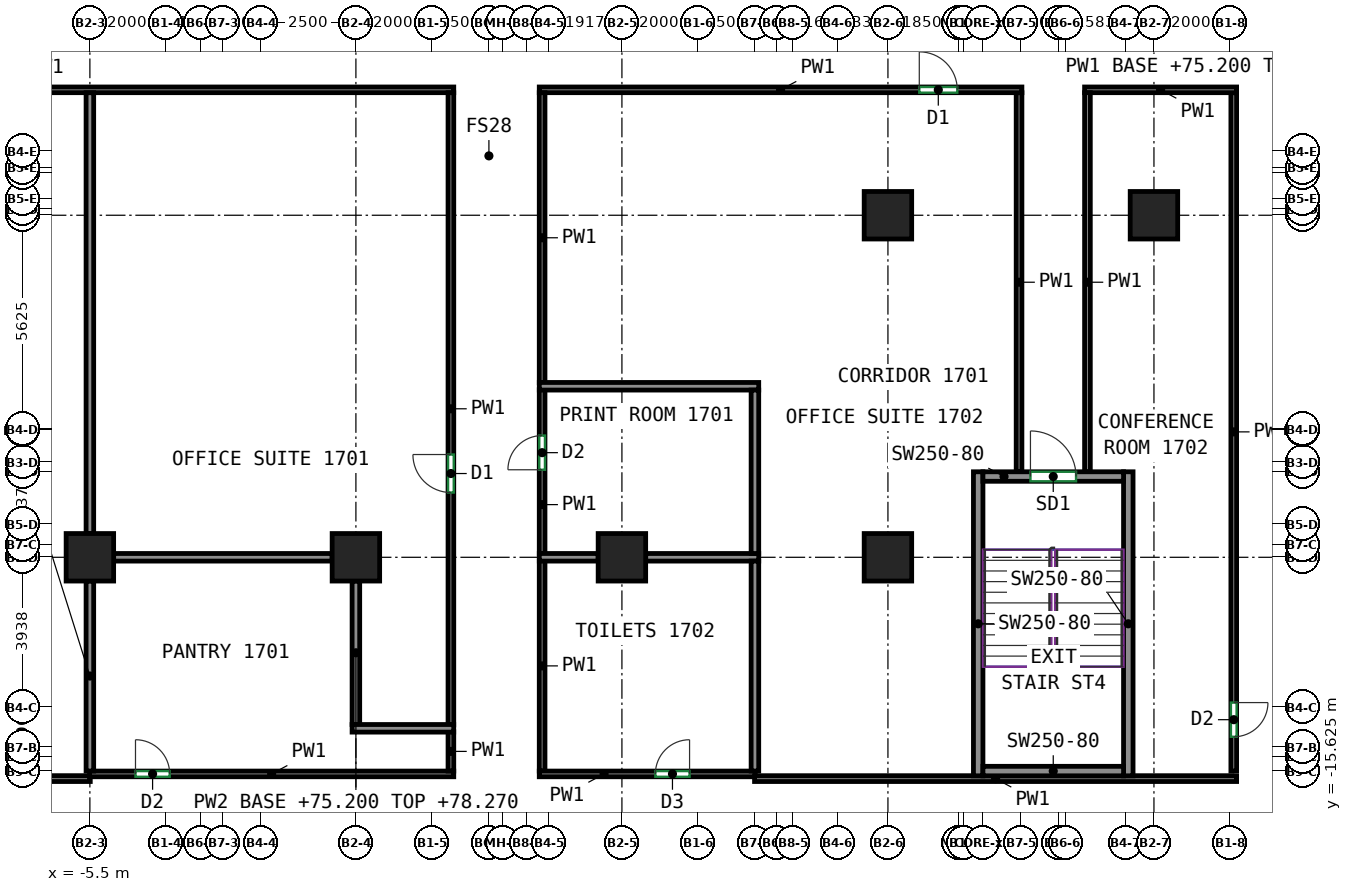
"""IFC4 building model, lengths in metres.
Left out: names, types, materials, properties, quantities, classifications, styles, units other than length and angle.
Written with IfcOpenShell. Run it as: python <this file> out.ifc"""

import sys

from ifc_helpers import new_model, si_unit, direction, frame, frame_2d, origin, origin_2d, place, context, subcontext, project, spatial, rectangle, extrude, source, transform, mapped, element, fill, save


model = new_model("IFC4")
c1 = context("Model", 3, precision=1e-05, world=origin(), true_north=direction((0.0, 1.0)))
c2 = subcontext(c1, "Body", "Model", "MODEL_VIEW")
j1 = project(units=[si_unit("LENGTHUNIT", "METRE"), si_unit("PLANEANGLEUNIT", "RADIAN")], contexts=[c1])
p1 = place(None, origin())
s1 = spatial("IfcSite", under=j1, at=p1, CompositionType="ELEMENT")
p2 = place(p1, origin())
s2 = spatial("IfcBuilding", under=s1, at=p2, CompositionType="ELEMENT")
p3 = place(p2, frame((0.0, 0.0, 75.2)))
s3 = spatial("IfcBuildingStorey", under=s2, at=p3, CompositionType="ELEMENT", Elevation=75.2)
m1 = source(origin(), c2, "Body", "SweptSolid", [
    extrude(rectangle(XDim=1.25, YDim=1.25, at=origin_2d()), origin(), (0.0, 0.0, 1.0), 3.72),
])
for number, where, z_axis, x_axis in (
    (1, (-5.5, -10.0, 0.0), (0.0, 0.0, 1.0), (1.0, 0.0, 0.0)),
    (2, (1.5, -10.0, 0.0), (0.0, 0.0, 1.0), (1.0, 0.0, 0.0)),
    (3, (8.5, -10.0, 0.0), (0.0, 0.0, 1.0), (1.0, 0.0, 0.0)),
    (4, (15.5, -10.0, 0.0), (0.0, 0.0, 1.0), (1.0, 0.0, 0.0)),
    (5, (15.5, -1.0, 0.0), (0.0, 0.0, 1.0), (1.0, 0.0, 0.0)),
    (6, (22.5, -1.0, 0.0), (0.0, 0.0, 1.0), (1.0, 0.0, 0.0)),
):
    element("IfcColumn", number, at=place(p3, frame(where, z_axis=z_axis, x_axis=x_axis)), inside=s3, PredefinedType="COLUMN", context=c2, shape_type="MappedRepresentation", body=[
        mapped(m1, transform((0.0, 0.0, 0.0))),
    ])
m2 = source(origin(), c2, "Body", "SweptSolid", [
    extrude(rectangle(XDim=8.0, YDim=0.25, at=frame_2d((4.0, 0.0))), origin(), (0.0, 0.0, 1.0), 3.72),
])
for number, where, z_axis, x_axis in (
    (7, (17.875, -15.75, 0.0), (0.0, 0.0, 1.0), (0.0, 1.0, 0.0)),
    (8, (21.825, -15.75, 0.0), (0.0, 0.0, 1.0), (0.0, 1.0, 0.0)),
):
    element("IfcWall", number, at=place(p3, frame(where, z_axis=z_axis, x_axis=x_axis)), inside=s3, PredefinedType="SHEAR", context=c2, shape_type="MappedRepresentation", body=[
        mapped(m2, transform((0.0, 0.0, 0.0))),
    ])
m3 = source(origin(), c2, "Body", "SweptSolid", [
    extrude(rectangle(XDim=3.7, YDim=0.25, at=frame_2d((1.85, 0.0))), origin(), (0.0, 0.0, 1.0), 3.72),
])
p4 = place(p3, frame((18.0, -15.625, 0.0), z_axis=(0.0, 0.0, 1.0), x_axis=(1.0, 0.0, 0.0)))
e9 = element("IfcWall", 9, at=p4, inside=s3, PredefinedType="SHEAR", context=c2, shape_type="MappedRepresentation", body=[
    mapped(m3, transform((0.0, 0.0, 0.0))),
])
p5 = place(p3, frame((18.0, -7.875, 0.0), z_axis=(0.0, 0.0, 1.0), x_axis=(1.0, 0.0, 0.0)))
e10 = element("IfcWall", 10, at=p5, inside=s3, PredefinedType="SHEAR", context=c2, shape_type="MappedRepresentation", body=[
    mapped(m3, transform((0.0, 0.0, 0.0))),
])
p6 = place(p5, frame((1.25, 0.0, 0.0)))
e11 = element("IfcOpeningElement", 11, at=p6, cuts=e10, PredefinedType="OPENING", context=c2, shape_type="SweptSolid", body=[
    extrude(rectangle(XDim=1.2, YDim=2.1, at=frame_2d((0.6, 1.05))), frame((0.0, 0.135, 0.0), z_axis=(0.0, -1.0, 0.0), x_axis=(1.0, 0.0, 0.0)), (0.0, 0.0, 1.0), 0.27),
])
p7 = place(p3, frame((-14.9, -15.825, 0.0), z_axis=(0.0, 0.0, 1.0), x_axis=(1.0, 0.0, 0.0)))
e12 = element("IfcWall", 12, at=p7, inside=s3, PredefinedType="PARTITIONING", context=c2, shape_type="SweptSolid", body=[
    extrude(rectangle(XDim=9.41, YDim=0.15, at=frame_2d((4.705, 0.0))), origin(), (0.0, 0.0, 1.0), 3.72),
])
p8 = place(p3, frame((-19.325, 2.3, 0.0), z_axis=(0.0, 0.0, 1.0), x_axis=(1.0, 0.0, 0.0)))
e13 = element("IfcWall", 13, at=p8, inside=s3, PredefinedType="PARTITIONING", context=c2, shape_type="SweptSolid", body=[
    extrude(rectangle(XDim=23.4, YDim=0.15, at=frame_2d((11.7, 0.0))), origin(), (0.0, 0.0, 1.0), 3.72),
])
p9 = place(p8, frame((8.726, 0.0, 0.0)))
e14 = element("IfcOpeningElement", 14, at=p9, cuts=e13, PredefinedType="OPENING", context=c2, shape_type="SweptSolid", body=[
    extrude(rectangle(XDim=1.8, YDim=2.1, at=frame_2d((0.9, 1.05))), frame((0.0, 0.085, 0.0), z_axis=(0.0, -1.0, 0.0), x_axis=(1.0, 0.0, 0.0)), (0.0, 0.0, 1.0), 0.17),
])
p10 = place(p3, frame((-5.51, -15.7, 0.0), z_axis=(0.0, 0.0, 1.0), x_axis=(1.0, 0.0, 0.0)))
e15 = element("IfcWall", 15, at=p10, inside=s3, PredefinedType="PARTITIONING", context=c2, shape_type="SweptSolid", body=[
    extrude(rectangle(XDim=9.585, YDim=0.15, at=frame_2d((4.792, 0.0))), origin(), (0.0, 0.0, 1.0), 3.72),
])
p11 = place(p10, frame((1.21, 0.0, 0.0)))
e16 = element("IfcOpeningElement", 16, at=p11, cuts=e15, PredefinedType="OPENING", context=c2, shape_type="SweptSolid", body=[
    extrude(rectangle(XDim=0.9, YDim=2.1, at=frame_2d((0.45, 1.05))), frame((0.0, 0.085, 0.0), z_axis=(0.0, -1.0, 0.0), x_axis=(1.0, 0.0, 0.0)), (0.0, 0.0, 1.0), 0.17),
])
p12 = place(p3, frame((4.0, -15.625, 0.0), z_axis=(0.0, 0.0, 1.0), x_axis=(0.0, 1.0, 0.0)))
e17 = element("IfcWall", 17, at=p12, inside=s3, PredefinedType="PARTITIONING", context=c2, shape_type="SweptSolid", body=[
    extrude(rectangle(XDim=1.035, YDim=0.15, at=frame_2d((0.518, 0.0))), origin(), (0.0, 0.0, 1.0), 3.72),
])
p13 = place(p3, frame((4.0, -14.41, 0.0), z_axis=(0.0, 0.0, 1.0), x_axis=(0.0, 1.0, 0.0)))
e18 = element("IfcWall", 18, at=p13, inside=s3, PredefinedType="PARTITIONING", context=c2, shape_type="SweptSolid", body=[
    extrude(rectangle(XDim=16.635, YDim=0.15, at=frame_2d((8.317, 0.0))), origin(), (0.0, 0.0, 1.0), 3.72),
])
p14 = place(p13, frame((6.114, 0.0, 0.0)))
e19 = element("IfcOpeningElement", 19, at=p14, cuts=e18, PredefinedType="OPENING", context=c2, shape_type="SweptSolid", body=[
    extrude(rectangle(XDim=1.0, YDim=2.1, at=frame_2d((0.5, 1.05))), frame((0.0, 0.085, 0.0), z_axis=(0.0, -1.0, 0.0), x_axis=(1.0, 0.0, 0.0)), (0.0, 0.0, 1.0), 0.17),
])
p15 = place(p3, frame((6.4, -15.625, 0.0), z_axis=(0.0, 0.0, 1.0), x_axis=(0.0, 1.0, 0.0)))
e20 = element("IfcWall", 20, at=p15, inside=s3, PredefinedType="PARTITIONING", context=c2, shape_type="SweptSolid", body=[
    extrude(rectangle(XDim=5.535, YDim=0.15, at=frame_2d((2.768, 0.0))), origin(), (0.0, 0.0, 1.0), 3.72),
])
p16 = place(p3, frame((6.325, -15.7, 0.0), z_axis=(0.0, 0.0, 1.0), x_axis=(1.0, 0.0, 0.0)))
e21 = element("IfcWall", 21, at=p16, inside=s3, PredefinedType="PARTITIONING", context=c2, shape_type="SweptSolid", body=[
    extrude(rectangle(XDim=5.685, YDim=0.15, at=frame_2d((2.843, 0.0))), origin(), (0.0, 0.0, 1.0), 3.72),
])
p17 = place(p16, frame((3.055, 0.0, 0.0)))
e22 = element("IfcOpeningElement", 22, at=p17, cuts=e21, PredefinedType="OPENING", context=c2, shape_type="SweptSolid", body=[
    extrude(rectangle(XDim=0.9, YDim=2.1, at=frame_2d((0.45, 1.05))), frame((0.0, 0.085, 0.0), z_axis=(0.0, -1.0, 0.0), x_axis=(1.0, 0.0, 0.0)), (0.0, 0.0, 1.0), 0.17),
])
p18 = place(p3, frame((6.4, -9.91, 0.0), z_axis=(0.0, 0.0, 1.0), x_axis=(0.0, 1.0, 0.0)))
e23 = element("IfcWall", 23, at=p18, inside=s3, PredefinedType="PARTITIONING", context=c2, shape_type="SweptSolid", body=[
    extrude(rectangle(XDim=4.32, YDim=0.15, at=frame_2d((2.16, 0.0))), origin(), (0.0, 0.0, 1.0), 3.72),
])
p19 = place(p18, frame((2.213, 0.0, 0.0)))
e24 = element("IfcOpeningElement", 24, at=p19, cuts=e23, PredefinedType="OPENING", context=c2, shape_type="SweptSolid", body=[
    extrude(rectangle(XDim=0.9, YDim=2.1, at=frame_2d((0.45, 1.05))), frame((0.0, 0.085, 0.0), z_axis=(0.0, -1.0, 0.0), x_axis=(1.0, 0.0, 0.0)), (0.0, 0.0, 1.0), 0.17),
])
p20 = place(p3, frame((18.95, 2.225, 0.0), z_axis=(0.0, 0.0, 1.0), x_axis=(0.0, -1.0, 0.0)))
e25 = element("IfcWall", 25, at=p20, inside=s3, PredefinedType="PARTITIONING", context=c2, shape_type="SweptSolid", body=[
    extrude(rectangle(XDim=9.975, YDim=0.15, at=frame_2d((4.988, 0.0))), origin(), (0.0, 0.0, 1.0), 3.72),
])
p21 = place(p3, frame((6.325, 2.3, 0.0), z_axis=(0.0, 0.0, 1.0), x_axis=(1.0, 0.0, 0.0)))
e26 = element("IfcWall", 26, at=p21, inside=s3, PredefinedType="PARTITIONING", context=c2, shape_type="SweptSolid", body=[
    extrude(rectangle(XDim=12.7, YDim=0.15, at=frame_2d((6.35, 0.0))), origin(), (0.0, 0.0, 1.0), 3.72),
])
p22 = place(p21, frame((10.0, 0.0, 0.0)))
e27 = element("IfcOpeningElement", 27, at=p22, cuts=e26, PredefinedType="OPENING", context=c2, shape_type="SweptSolid", body=[
    extrude(rectangle(XDim=1.0, YDim=2.1, at=frame_2d((0.5, 1.05))), frame((0.0, 0.085, 0.0), z_axis=(0.0, -1.0, 0.0), x_axis=(1.0, 0.0, 0.0)), (0.0, 0.0, 1.0), 0.17),
])
p23 = place(p3, frame((6.4, -5.41, 0.0), z_axis=(0.0, 0.0, 1.0), x_axis=(0.0, 1.0, 0.0)))
e28 = element("IfcWall", 28, at=p23, inside=s3, PredefinedType="PARTITIONING", context=c2, shape_type="SweptSolid", body=[
    extrude(rectangle(XDim=7.635, YDim=0.15, at=frame_2d((3.817, 0.0))), origin(), (0.0, 0.0, 1.0), 3.72),
])
p24 = place(p3, frame((11.99, -15.825, 0.0), z_axis=(0.0, 0.0, 1.0), x_axis=(1.0, 0.0, 0.0)))
e29 = element("IfcWall", 29, at=p24, inside=s3, PredefinedType="PARTITIONING", context=c2, shape_type="SweptSolid", body=[
    extrude(rectangle(XDim=12.685, YDim=0.15, at=frame_2d((6.343, 0.0))), origin(), (0.0, 0.0, 1.0), 3.72),
])
p25 = place(p3, frame((24.6, 2.225, 0.0), z_axis=(0.0, 0.0, 1.0), x_axis=(0.0, -1.0, 0.0)))
e30 = element("IfcWall", 30, at=p25, inside=s3, PredefinedType="PARTITIONING", context=c2, shape_type="SweptSolid", body=[
    extrude(rectangle(XDim=17.85, YDim=0.15, at=frame_2d((8.925, 0.0))), origin(), (0.0, 0.0, 1.0), 3.72),
])
p26 = place(p25, frame((16.048, 0.0, 0.0)))
e31 = element("IfcOpeningElement", 31, at=p26, cuts=e30, PredefinedType="OPENING", context=c2, shape_type="SweptSolid", body=[
    extrude(rectangle(XDim=0.9, YDim=2.1, at=frame_2d((0.45, 1.05))), frame((0.0, 0.085, 0.0), z_axis=(0.0, -1.0, 0.0), x_axis=(1.0, 0.0, 0.0)), (0.0, 0.0, 1.0), 0.17),
])
p27 = place(p3, frame((20.675, 2.3, 0.0), z_axis=(0.0, 0.0, 1.0), x_axis=(1.0, 0.0, 0.0)))
e32 = element("IfcWall", 32, at=p27, inside=s3, PredefinedType="PARTITIONING", context=c2, shape_type="SweptSolid", body=[
    extrude(rectangle(XDim=4.0, YDim=0.15, at=frame_2d((2.0, 0.0))), origin(), (0.0, 0.0, 1.0), 3.72),
])
p28 = place(p3, frame((20.75, -7.75, 0.0), z_axis=(0.0, 0.0, 1.0), x_axis=(0.0, 1.0, 0.0)))
e33 = element("IfcWall", 33, at=p28, inside=s3, PredefinedType="PARTITIONING", context=c2, shape_type="SweptSolid", body=[
    extrude(rectangle(XDim=9.975, YDim=0.15, at=frame_2d((4.988, 0.0))), origin(), (0.0, 0.0, 1.0), 3.72),
])
p29 = place(p3, frame((-5.5, -15.624, 0.0), z_axis=(0.0, 0.0, 1.0), x_axis=(0.0, 1.0, 0.0)))
e34 = element("IfcWall", 34, at=p29, inside=s3, PredefinedType="PARTITIONING", context=c2, shape_type="SweptSolid", body=[
    extrude(rectangle(XDim=4.999, YDim=0.2, at=frame_2d((2.5, 0.0))), origin(), (0.0, 0.0, 1.0), 3.07),
])
p30 = place(p3, frame((-5.5, -9.375, 0.0), z_axis=(0.0, 0.0, 1.0), x_axis=(0.0, 1.0, 0.0)))
e35 = element("IfcWall", 35, at=p30, inside=s3, PredefinedType="PARTITIONING", context=c2, shape_type="SweptSolid", body=[
    extrude(rectangle(XDim=11.599, YDim=0.2, at=frame_2d((5.8, 0.0))), origin(), (0.0, 0.0, 1.0), 3.72),
])
p31 = place(p3, frame((-4.875, -10.0, 0.0), z_axis=(0.0, 0.0, 1.0), x_axis=(1.0, 0.0, 0.0)))
e36 = element("IfcWall", 36, at=p31, inside=s3, PredefinedType="PARTITIONING", context=c2, shape_type="SweptSolid", body=[
    extrude(rectangle(XDim=5.75, YDim=0.2, at=frame_2d((2.875, 0.0))), origin(), (0.0, 0.0, 1.0), 3.72),
])
p32 = place(p3, frame((1.5, -14.4, 0.0), z_axis=(0.0, 0.0, 1.0), x_axis=(0.0, 1.0, 0.0)))
e37 = element("IfcWall", 37, at=p32, inside=s3, PredefinedType="PARTITIONING", context=c2, shape_type="SweptSolid", body=[
    extrude(rectangle(XDim=3.775, YDim=0.2, at=frame_2d((1.887, 0.0))), origin(), (0.0, 0.0, 1.0), 3.07),
])
p33 = place(p3, frame((1.4, -14.5, 0.0), z_axis=(0.0, 0.0, 1.0), x_axis=(1.0, 0.0, 0.0)))
e38 = element("IfcWall", 38, at=p33, inside=s3, PredefinedType="PARTITIONING", context=c2, shape_type="SweptSolid", body=[
    extrude(rectangle(XDim=2.674, YDim=0.2, at=frame_2d((1.337, 0.0))), origin(), (0.0, 0.0, 1.0), 3.72),
])
p34 = place(p3, frame((6.326, -10.0, 0.0), z_axis=(0.0, 0.0, 1.0), x_axis=(1.0, 0.0, 0.0)))
e39 = element("IfcWall", 39, at=p34, inside=s3, PredefinedType="PARTITIONING", context=c2, shape_type="SweptSolid", body=[
    extrude(rectangle(XDim=1.549, YDim=0.2, at=frame_2d((0.774, 0.0))), origin(), (0.0, 0.0, 1.0), 3.72),
])
p35 = place(p3, frame((9.125, -10.0, 0.0), z_axis=(0.0, 0.0, 1.0), x_axis=(1.0, 0.0, 0.0)))
e40 = element("IfcWall", 40, at=p35, inside=s3, PredefinedType="PARTITIONING", context=c2, shape_type="SweptSolid", body=[
    extrude(rectangle(XDim=2.975, YDim=0.2, at=frame_2d((1.488, 0.0))), origin(), (0.0, 0.0, 1.0), 3.72),
])
p36 = place(p3, frame((12.0, -15.624, 0.0), z_axis=(0.0, 0.0, 1.0), x_axis=(0.0, 1.0, 0.0)))
e41 = element("IfcWall", 41, at=p36, inside=s3, PredefinedType="PARTITIONING", context=c2, shape_type="SweptSolid", body=[
    extrude(rectangle(XDim=5.524, YDim=0.2, at=frame_2d((2.762, 0.0))), origin(), (0.0, 0.0, 1.0), 3.72),
])
p37 = place(p3, frame((12.1, -5.5, 0.0), z_axis=(0.0, 0.0, 1.0), x_axis=(-1.0, 0.0, 0.0)))
e42 = element("IfcWall", 42, at=p37, inside=s3, PredefinedType="PARTITIONING", context=c2, shape_type="SweptSolid", body=[
    extrude(rectangle(XDim=5.774, YDim=0.2, at=frame_2d((2.887, 0.0))), origin(), (0.0, 0.0, 1.0), 3.72),
])
p38 = place(p3, frame((12.0, -9.9, 0.0), z_axis=(0.0, 0.0, 1.0), x_axis=(0.0, 1.0, 0.0)))
e43 = element("IfcWall", 43, at=p38, inside=s3, PredefinedType="PARTITIONING", context=c2, shape_type="SweptSolid", body=[
    extrude(rectangle(XDim=4.3, YDim=0.2, at=frame_2d((2.15, 0.0))), origin(), (0.0, 0.0, 1.0), 3.72),
])
p39 = place(p6, origin())
e44 = element("IfcDoor", 44, at=p39, inside=s3, OperationType="DOUBLE_DOOR_SINGLE_SWING", PredefinedType="DOOR", context=c2, shape_type="SweptSolid", body=[
    extrude(rectangle(XDim=1.2, YDim=2.1, at=frame_2d((0.6, 1.05))), frame((0.0, 0.025, 0.0), z_axis=(0.0, -1.0, 0.0), x_axis=(1.0, 0.0, 0.0)), (0.0, 0.0, 1.0), 0.05),
])
fill(e11, e44)
p40 = place(p11, origin())
e45 = element("IfcDoor", 45, at=p40, inside=s3, OperationType="SINGLE_SWING_LEFT", PredefinedType="DOOR", context=c2, shape_type="SweptSolid", body=[
    extrude(rectangle(XDim=0.9, YDim=2.1, at=frame_2d((0.45, 1.05))), frame((0.0, 0.025, 0.0), z_axis=(0.0, -1.0, 0.0), x_axis=(1.0, 0.0, 0.0)), (0.0, 0.0, 1.0), 0.05),
])
fill(e16, e45)
p41 = place(p17, origin())
e46 = element("IfcDoor", 46, at=p41, inside=s3, OperationType="SINGLE_SWING_RIGHT", PredefinedType="DOOR", context=c2, shape_type="SweptSolid", body=[
    extrude(rectangle(XDim=0.9, YDim=2.1, at=frame_2d((0.45, 1.05))), frame((0.0, 0.025, 0.0), z_axis=(0.0, -1.0, 0.0), x_axis=(1.0, 0.0, 0.0)), (0.0, 0.0, 1.0), 0.05),
])
fill(e22, e46)
p42 = place(p26, origin())
e47 = element("IfcDoor", 47, at=p42, inside=s3, OperationType="SINGLE_SWING_LEFT", PredefinedType="DOOR", context=c2, shape_type="SweptSolid", body=[
    extrude(rectangle(XDim=0.9, YDim=2.1, at=frame_2d((0.45, 1.05))), frame((0.0, 0.025, 0.0), z_axis=(0.0, -1.0, 0.0), x_axis=(1.0, 0.0, 0.0)), (0.0, 0.0, 1.0), 0.05),
])
fill(e31, e47)
p43 = place(p14, origin())
e48 = element("IfcDoor", 48, at=p43, inside=s3, OperationType="SINGLE_SWING_RIGHT", PredefinedType="DOOR", context=c2, shape_type="SweptSolid", body=[
    extrude(rectangle(XDim=1.0, YDim=2.1, at=frame_2d((0.5, 1.05))), frame((0.0, 0.025, 0.0), z_axis=(0.0, -1.0, 0.0), x_axis=(1.0, 0.0, 0.0)), (0.0, 0.0, 1.0), 0.05),
])
fill(e19, e48)
p44 = place(p19, origin())
e49 = element("IfcDoor", 49, at=p44, inside=s3, OperationType="SINGLE_SWING_LEFT", PredefinedType="DOOR", context=c2, shape_type="SweptSolid", body=[
    extrude(rectangle(XDim=0.9, YDim=2.1, at=frame_2d((0.45, 1.05))), frame((0.0, 0.025, 0.0), z_axis=(0.0, -1.0, 0.0), x_axis=(1.0, 0.0, 0.0)), (0.0, 0.0, 1.0), 0.05),
])
fill(e24, e49)
p45 = place(p22, origin())
e50 = element("IfcDoor", 50, at=p45, inside=s3, OperationType="SINGLE_SWING_LEFT", PredefinedType="DOOR", context=c2, shape_type="SweptSolid", body=[
    extrude(rectangle(XDim=1.0, YDim=2.1, at=frame_2d((0.5, 1.05))), frame((0.0, 0.025, 0.0), z_axis=(0.0, -1.0, 0.0), x_axis=(1.0, 0.0, 0.0)), (0.0, 0.0, 1.0), 0.05),
])
fill(e27, e50)
save(model, sys.argv[1])
